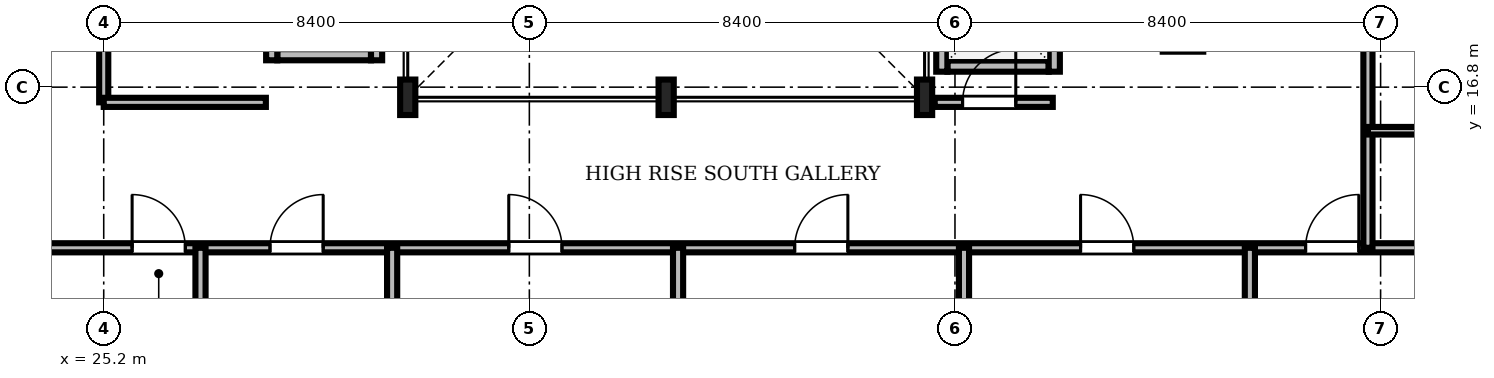
"""IFC4 building model, lengths in metres.
Left out: names, types, materials, properties, quantities, classifications, styles, units other than length and angle.
Written with IfcOpenShell. Run it as: python <this file> out.ifc"""

import sys

from ifc_helpers import new_model, si_unit, direction, frame, frame_2d, origin, origin_2d, place, context, subcontext, project, spatial, rectangle, i_section, extrude, source, transform, mapped, element, fill, save


model = new_model("IFC4")
c1 = context("Model", 3, precision=1e-05, world=origin(), true_north=direction((0.0, 1.0)))
c2 = subcontext(c1, "Body", "Model", "MODEL_VIEW")
j1 = project(units=[si_unit("LENGTHUNIT", "METRE"), si_unit("PLANEANGLEUNIT", "RADIAN")], contexts=[c1])
p1 = place(None, origin())
s1 = spatial("IfcSite", under=j1, at=p1, CompositionType="ELEMENT")
p2 = place(p1, origin())
s2 = spatial("IfcBuilding", under=s1, at=p2, CompositionType="ELEMENT")
p3 = place(p2, frame((0.0, 0.0, 226.05)))
s3 = spatial("IfcBuildingStorey", under=s2, at=p3, CompositionType="ELEMENT", Elevation=226.05)
m1 = source(origin(), c2, "Body", "SweptSolid", [
    extrude(i_section(OverallWidth=0.3, OverallDepth=0.7, WebThickness=0.017, FlangeThickness=0.032, FilletRadius=0.027, at=origin_2d()), origin(), (0.0, 0.0, 1.0), 3.53),
])
for number, where, z_axis, x_axis in (
    (1, (31.2, 16.6, 0.0), (0.0, 0.0, 1.0), (1.0, 0.0, 0.0)),
    (2, (36.3, 16.6, 0.0), (0.0, 0.0, 1.0), (1.0, 0.0, 0.0)),
    (3, (41.4, 16.6, 0.0), (0.0, 0.0, 1.0), (1.0, 0.0, 0.0)),
):
    element("IfcColumn", number, at=place(p3, frame(where, z_axis=z_axis, x_axis=x_axis)), inside=s3, PredefinedType="COLUMN", context=c2, shape_type="MappedRepresentation", body=[
        mapped(m1, transform((0.0, 0.0, 0.0), scale=1.0)),
    ])
m2 = source(origin(), c2, "Body", "SweptSolid", [
    extrude(rectangle(XDim=2.0, YDim=0.22, at=frame_2d((1.0, 0.0))), origin(), (0.0, 0.0, 1.0), 3.53),
])
p4 = place(p3, frame((41.85, 17.215, 0.0), z_axis=(0.0, 0.0, 1.0), x_axis=(1.0, 0.0, 0.0)))
e4 = element("IfcWall", 4, at=p4, inside=s3, PredefinedType="SOLIDWALL", context=c2, shape_type="MappedRepresentation", body=[
    mapped(m2, transform((0.0, 0.0, 0.0), scale=1.0)),
])
m3 = source(origin(), c2, "Body", "SweptSolid", [
    extrude(rectangle(XDim=2.19, YDim=0.22, at=frame_2d((1.095, 0.0))), origin(), (0.0, 0.0, 1.0), 3.53),
])
p5 = place(p3, frame((41.74, 17.105, 0.0), z_axis=(0.0, 0.0, 1.0), x_axis=(0.0, 1.0, 0.0)))
e5 = element("IfcWall", 5, at=p5, inside=s3, PredefinedType="SOLIDWALL", context=c2, shape_type="MappedRepresentation", body=[
    mapped(m3, transform((0.0, 0.0, 0.0), scale=1.0)),
])
p6 = place(p3, frame((43.96, 17.105, 0.0), z_axis=(0.0, 0.0, 1.0), x_axis=(0.0, 1.0, 0.0)))
e6 = element("IfcWall", 6, at=p6, inside=s3, PredefinedType="SOLIDWALL", context=c2, shape_type="MappedRepresentation", body=[
    mapped(m3, transform((0.0, 0.0, 0.0), scale=1.0)),
])
m4 = source(origin(), c2, "Body", "SweptSolid", [
    extrude(rectangle(XDim=1.1, YDim=2.2, at=frame_2d((0.55, 1.1))), frame((0.0, 0.12, 0.0), z_axis=(0.0, -1.0, 0.0), x_axis=(1.0, 0.0, 0.0)), (0.0, 0.0, 1.0), 0.24),
])
p7 = place(p6, frame((0.545, 0.0, 0.0)))
e7 = element("IfcOpeningElement", 7, at=p7, cuts=e6, PredefinedType="OPENING", context=c2, shape_type="MappedRepresentation", body=[
    mapped(m4, transform((0.0, 0.0, 0.0), scale=1.0)),
])
m5 = source(origin(), c2, "Body", "SweptSolid", [
    extrude(rectangle(XDim=1.85, YDim=0.22, at=frame_2d((0.925, 0.0))), origin(), (0.0, 0.0, 1.0), 2.972),
])
p8 = place(p3, frame((28.625, 17.44, 0.0), z_axis=(0.0, 0.0, 1.0), x_axis=(1.0, 0.0, 0.0)))
e8 = element("IfcWall", 8, at=p8, inside=s3, PredefinedType="SOLIDWALL", context=c2, shape_type="MappedRepresentation", body=[
    mapped(m5, transform((0.0, 0.0, 0.0), scale=1.0)),
])
m6 = source(origin(), c2, "Body", "SweptSolid", [
    extrude(rectangle(XDim=2.54, YDim=0.22, at=frame_2d((1.27, 0.0))), origin(), (0.0, 0.0, 1.0), 2.972),
])
p9 = place(p3, frame((28.515, 17.33, 0.0), z_axis=(0.0, 0.0, 1.0), x_axis=(0.0, 1.0, 0.0)))
e9 = element("IfcWall", 9, at=p9, inside=s3, PredefinedType="SOLIDWALL", context=c2, shape_type="MappedRepresentation", body=[
    mapped(m6, transform((0.0, 0.0, 0.0), scale=1.0)),
])
m7 = source(origin(), c2, "Body", "SweptSolid", [
    extrude(rectangle(XDim=2.54, YDim=0.22, at=frame_2d((1.27, 0.0))), origin(), (0.0, 0.0, 1.0), 3.53),
])
p10 = place(p3, frame((30.585, 17.33, 0.0), z_axis=(0.0, 0.0, 1.0), x_axis=(0.0, 1.0, 0.0)))
e10 = element("IfcWall", 10, at=p10, inside=s3, PredefinedType="SOLIDWALL", context=c2, shape_type="MappedRepresentation", body=[
    mapped(m7, transform((0.0, 0.0, 0.0), scale=1.0)),
])
m8 = source(origin(), c2, "Body", "SweptSolid", [
    extrude(rectangle(XDim=46.156, YDim=0.18, at=frame_2d((23.078, 0.0))), origin(), (0.0, 0.0, 1.0), 2.772),
])
p11 = place(p3, frame((11.422, 13.63, 0.0), z_axis=(0.0, 0.0, 1.0), x_axis=(1.0, 0.0, 0.0)))
e11 = element("IfcWall", 11, at=p11, inside=s3, PredefinedType="PARTITIONING", context=c2, shape_type="MappedRepresentation", body=[
    mapped(m8, transform((0.0, 0.0, 0.0), scale=1.0)),
])
m9 = source(origin(), c2, "Body", "SweptSolid", [
    extrude(rectangle(XDim=1.05, YDim=2.2, at=frame_2d((0.525, 1.1))), frame((0.0, 0.1, 0.0), z_axis=(0.0, -1.0, 0.0), x_axis=(1.0, 0.0, 0.0)), (0.0, 0.0, 1.0), 0.2),
])
p12 = place(p11, frame((14.338, 0.0, 0.0)))
e12 = element("IfcOpeningElement", 12, at=p12, cuts=e11, PredefinedType="OPENING", context=c2, shape_type="MappedRepresentation", body=[
    mapped(m9, transform((0.0, 0.0, 0.0), scale=1.0)),
])
p13 = place(p11, frame((17.059, 0.0, 0.0)))
e13 = element("IfcOpeningElement", 13, at=p13, cuts=e11, PredefinedType="OPENING", context=c2, shape_type="MappedRepresentation", body=[
    mapped(m9, transform((0.0, 0.0, 0.0), scale=1.0)),
])
p14 = place(p11, frame((21.772, 0.0, 0.0)))
e14 = element("IfcOpeningElement", 14, at=p14, cuts=e11, PredefinedType="OPENING", context=c2, shape_type="MappedRepresentation", body=[
    mapped(m9, transform((0.0, 0.0, 0.0), scale=1.0)),
])
p15 = place(p11, frame((27.414, 0.0, 0.0)))
e15 = element("IfcOpeningElement", 15, at=p15, cuts=e11, PredefinedType="OPENING", context=c2, shape_type="MappedRepresentation", body=[
    mapped(m9, transform((0.0, 0.0, 0.0), scale=1.0)),
])
p16 = place(p11, frame((33.057, 0.0, 0.0)))
e16 = element("IfcOpeningElement", 16, at=p16, cuts=e11, PredefinedType="OPENING", context=c2, shape_type="MappedRepresentation", body=[
    mapped(m9, transform((0.0, 0.0, 0.0), scale=1.0)),
])
p17 = place(p11, frame((37.498, 0.0, 0.0)))
e17 = element("IfcOpeningElement", 17, at=p17, cuts=e11, PredefinedType="OPENING", context=c2, shape_type="MappedRepresentation", body=[
    mapped(m9, transform((0.0, 0.0, 0.0), scale=1.0)),
])
m10 = source(origin(), c2, "Body", "SweptSolid", [
    extrude(rectangle(XDim=27.47, YDim=0.18, at=frame_2d((13.735, 0.0))), origin(), (0.0, 0.0, 1.0), 2.972),
])
p18 = place(p3, frame((50.15, 13.63, 0.0), z_axis=(0.0, 0.0, 1.0), x_axis=(0.0, 1.0, 0.0)))
e18 = element("IfcWall", 18, at=p18, inside=s3, PredefinedType="PARTITIONING", context=c2, shape_type="MappedRepresentation", body=[
    mapped(m10, transform((0.0, 0.0, 0.0), scale=1.0)),
])
p19 = place(p18, frame((4.071, 0.0, 0.0)))
e19 = element("IfcOpeningElement", 19, at=p19, cuts=e18, PredefinedType="OPENING", context=c2, shape_type="MappedRepresentation", body=[
    mapped(m9, transform((0.0, 0.0, 0.0), scale=1.0)),
])
p20 = place(p18, frame((10.884, 0.0, 0.0)))
e20 = element("IfcOpeningElement", 20, at=p20, cuts=e18, PredefinedType="OPENING", context=c2, shape_type="MappedRepresentation", body=[
    mapped(m9, transform((0.0, 0.0, 0.0), scale=1.0)),
])
p21 = place(p18, frame((17.696, 0.0, 0.0)))
e21 = element("IfcOpeningElement", 21, at=p21, cuts=e18, PredefinedType="OPENING", context=c2, shape_type="MappedRepresentation", body=[
    mapped(m9, transform((0.0, 0.0, 0.0), scale=1.0)),
])
p22 = place(p18, frame((24.509, 0.0, 0.0)))
e22 = element("IfcOpeningElement", 22, at=p22, cuts=e18, PredefinedType="OPENING", context=c2, shape_type="MappedRepresentation", body=[
    mapped(m9, transform((0.0, 0.0, 0.0), scale=1.0)),
])
m11 = source(origin(), c2, "Body", "SweptSolid", [
    extrude(rectangle(XDim=5.4, YDim=0.18, at=frame_2d((2.7, 0.0))), origin(), (0.0, 0.0, 1.0), 2.972),
])
p23 = place(p3, frame((25.2, 16.5, 0.0), z_axis=(0.0, 0.0, 1.0), x_axis=(0.0, 1.0, 0.0)))
e23 = element("IfcWall", 23, at=p23, inside=s3, PredefinedType="PARTITIONING", context=c2, shape_type="MappedRepresentation", body=[
    mapped(m11, transform((0.0, 0.0, 0.0), scale=1.0)),
])
p24 = place(p23, frame((2.0, 0.0, 0.0)))
e24 = element("IfcOpeningElement", 24, at=p24, cuts=e23, PredefinedType="OPENING", context=c2, shape_type="MappedRepresentation", body=[
    mapped(m9, transform((0.0, 0.0, 0.0), scale=1.0)),
])
m12 = source(origin(), c2, "Body", "SweptSolid", [
    extrude(rectangle(XDim=2.33, YDim=0.18, at=frame_2d((1.165, 0.0))), origin(), (0.0, 0.0, 1.0), 2.972),
])
p25 = place(p3, frame((41.6, 16.5, 0.0), z_axis=(0.0, 0.0, 1.0), x_axis=(1.0, 0.0, 0.0)))
e25 = element("IfcWall", 25, at=p25, inside=s3, PredefinedType="PARTITIONING", context=c2, shape_type="MappedRepresentation", body=[
    mapped(m12, transform((0.0, 0.0, 0.0), scale=1.0)),
])
p26 = place(p25, frame((0.55, 0.0, 0.0)))
e26 = element("IfcOpeningElement", 26, at=p26, cuts=e25, PredefinedType="OPENING", context=c2, shape_type="MappedRepresentation", body=[
    mapped(m9, transform((0.0, 0.0, 0.0), scale=1.0)),
])
m13 = source(origin(), c2, "Body", "SweptSolid", [
    extrude(rectangle(XDim=11.508, YDim=0.2, at=frame_2d((5.754, 0.0))), origin(), (0.0, 0.0, 1.0), 2.772),
])
for number, where, z_axis, x_axis in (
    (27, (27.11, 2.122, 0.0), (0.0, 0.0, 1.0), (0.0, 1.0, 0.0)),
    (28, (30.892, 2.122, 0.0), (0.0, 0.0, 1.0), (0.0, 1.0, 0.0)),
):
    element("IfcWall", number, at=place(p3, frame(where, z_axis=z_axis, x_axis=x_axis)), inside=s3, PredefinedType="PARTITIONING", context=c2, shape_type="MappedRepresentation", body=[
        mapped(m13, transform((0.0, 0.0, 0.0), scale=1.0)),
    ])
m14 = source(origin(), c2, "Body", "SweptSolid", [
    extrude(rectangle(XDim=11.7, YDim=0.2, at=frame_2d((5.85, 0.0))), origin(), (0.0, 0.0, 1.0), 2.772),
])
p27 = place(p3, frame((36.535, 1.93, 0.0), z_axis=(0.0, 0.0, 1.0), x_axis=(0.0, 1.0, 0.0)))
e29 = element("IfcWall", 29, at=p27, inside=s3, PredefinedType="PARTITIONING", context=c2, shape_type="MappedRepresentation", body=[
    mapped(m14, transform((0.0, 0.0, 0.0), scale=1.0)),
])
for number, where, z_axis, x_axis in (
    (30, (42.178, 2.122, 0.0), (0.0, 0.0, 1.0), (0.0, 1.0, 0.0)),
    (31, (47.82, 2.122, 0.0), (0.0, 0.0, 1.0), (0.0, 1.0, 0.0)),
):
    element("IfcWall", number, at=place(p3, frame(where, z_axis=z_axis, x_axis=x_axis)), inside=s3, PredefinedType="PARTITIONING", context=c2, shape_type="MappedRepresentation", body=[
        mapped(m13, transform((0.0, 0.0, 0.0), scale=1.0)),
    ])
m15 = source(origin(), c2, "Body", "SweptSolid", [
    extrude(rectangle(XDim=3.2, YDim=0.18, at=frame_2d((1.6, 0.0))), origin(), (0.0, 0.0, 1.0), 3.53),
])
p28 = place(p3, frame((25.2, 16.5, 0.0), z_axis=(0.0, 0.0, 1.0), x_axis=(1.0, 0.0, 0.0)))
e32 = element("IfcWall", 32, at=p28, inside=s3, PredefinedType="PARTITIONING", context=c2, shape_type="MappedRepresentation", body=[
    mapped(m15, transform((0.0, 0.0, 0.0), scale=1.0)),
])
m16 = source(origin(), c2, "Body", "SweptSolid", [
    extrude(rectangle(XDim=2.36, YDim=0.15, at=frame_2d((1.18, 0.0))), origin(), (0.0, 0.0, 1.0), 3.53),
])
p29 = place(p3, frame((50.15, 15.94, 0.0), z_axis=(0.0, 0.0, 1.0), x_axis=(1.0, 0.0, 0.0)))
e33 = element("IfcWall", 33, at=p29, inside=s3, PredefinedType="PARTITIONING", context=c2, shape_type="MappedRepresentation", body=[
    mapped(m16, transform((0.0, 0.0, 0.0), scale=1.0)),
])
m17 = source(origin(), c2, "Body", "SweptSolid", [
    extrude(rectangle(XDim=1.05, YDim=2.2, at=frame_2d((0.525, 1.1))), frame((0.0, 0.025, 0.0), z_axis=(0.0, -1.0, 0.0), x_axis=(1.0, 0.0, 0.0)), (0.0, 0.0, 1.0), 0.05),
])
p30 = place(p12, origin())
e34 = element("IfcDoor", 34, at=p30, inside=s3, OperationType="SINGLE_SWING_LEFT", PredefinedType="DOOR", context=c2, shape_type="MappedRepresentation", body=[
    mapped(m17, transform((0.0, 0.0, 0.0), scale=1.0)),
])
fill(e12, e34)
p31 = place(p13, origin())
e35 = element("IfcDoor", 35, at=p31, inside=s3, OperationType="SINGLE_SWING_RIGHT", PredefinedType="DOOR", context=c2, shape_type="MappedRepresentation", body=[
    mapped(m17, transform((0.0, 0.0, 0.0), scale=1.0)),
])
fill(e13, e35)
p32 = place(p14, origin())
e36 = element("IfcDoor", 36, at=p32, inside=s3, OperationType="SINGLE_SWING_LEFT", PredefinedType="DOOR", context=c2, shape_type="MappedRepresentation", body=[
    mapped(m17, transform((0.0, 0.0, 0.0), scale=1.0)),
])
fill(e14, e36)
p33 = place(p15, origin())
e37 = element("IfcDoor", 37, at=p33, inside=s3, OperationType="SINGLE_SWING_RIGHT", PredefinedType="DOOR", context=c2, shape_type="MappedRepresentation", body=[
    mapped(m17, transform((0.0, 0.0, 0.0), scale=1.0)),
])
fill(e15, e37)
p34 = place(p16, origin())
e38 = element("IfcDoor", 38, at=p34, inside=s3, OperationType="SINGLE_SWING_LEFT", PredefinedType="DOOR", context=c2, shape_type="MappedRepresentation", body=[
    mapped(m17, transform((0.0, 0.0, 0.0), scale=1.0)),
])
fill(e16, e38)
p35 = place(p17, origin())
e39 = element("IfcDoor", 39, at=p35, inside=s3, OperationType="SINGLE_SWING_RIGHT", PredefinedType="DOOR", context=c2, shape_type="MappedRepresentation", body=[
    mapped(m17, transform((0.0, 0.0, 0.0), scale=1.0)),
])
fill(e17, e39)
p36 = place(p26, origin())
e40 = element("IfcDoor", 40, at=p36, inside=s3, OperationType="SINGLE_SWING_RIGHT", PredefinedType="DOOR", context=c2, shape_type="MappedRepresentation", body=[
    mapped(m17, transform((0.0, 0.0, 0.0), scale=1.0)),
])
fill(e26, e40)
save(model, sys.argv[1])
